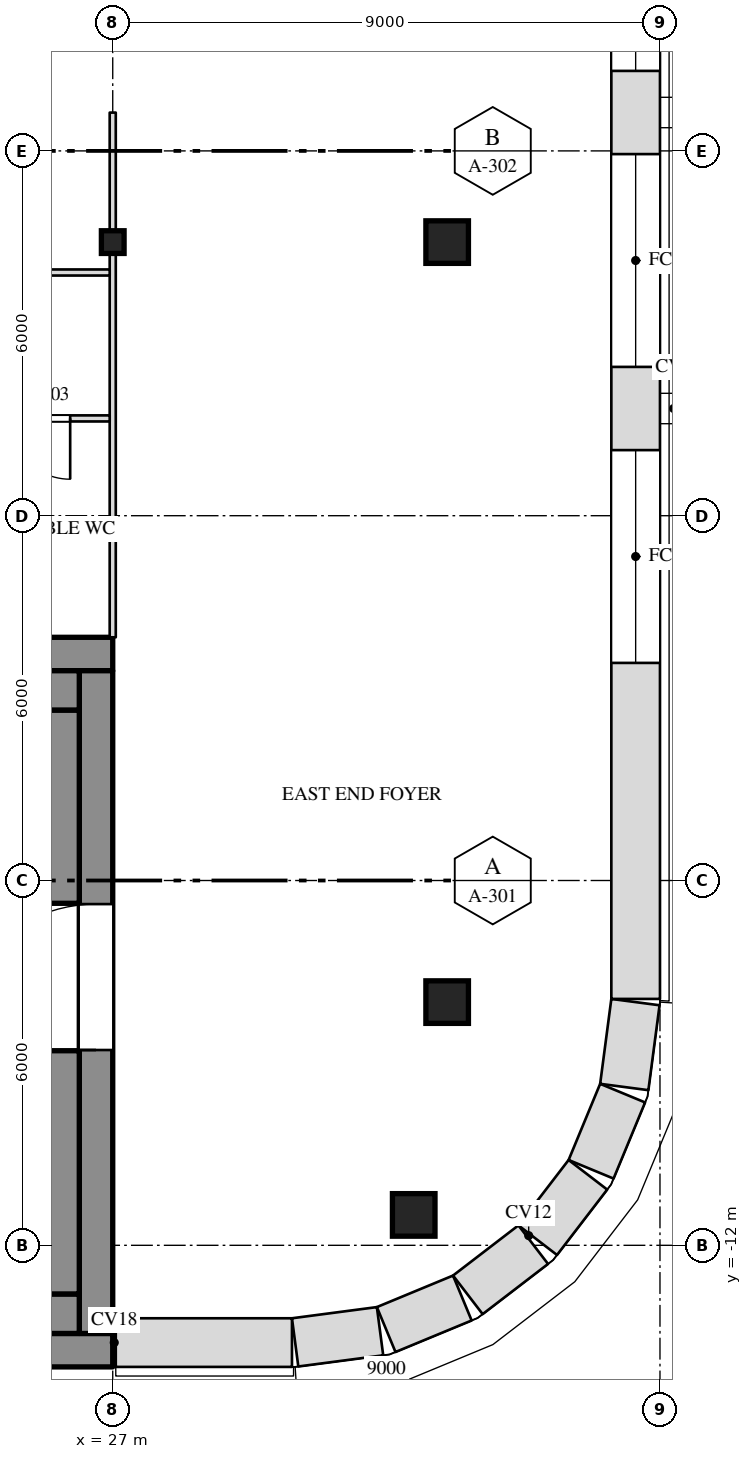
"""IFC4 building model, lengths in metres.
Left out: names, types, materials, properties, quantities, classifications, styles, units other than length and angle.
Written with IfcOpenShell. Run it as: python <this file> out.ifc"""

import sys

from ifc_helpers import new_model, si_unit, direction, frame, frame_2d, origin, origin_2d, place, context, subcontext, project, spatial, rectangle, i_section, extrude, element, fill, save


model = new_model("IFC4")
c1 = context("Model", 3, precision=1e-05, world=origin(), true_north=direction((0.0, 1.0)))
c2 = subcontext(c1, "Body", "Model", "MODEL_VIEW")
j1 = project(units=[si_unit("LENGTHUNIT", "METRE"), si_unit("PLANEANGLEUNIT", "RADIAN")], contexts=[c1])
p1 = place(None, origin())
s1 = spatial("IfcSite", under=j1, at=p1, CompositionType="ELEMENT")
p2 = place(p1, origin())
s2 = spatial("IfcBuilding", under=s1, at=p2, CompositionType="ELEMENT")
p3 = place(p2, frame((0.0, 0.0, 272.5)))
s3 = spatial("IfcBuildingStorey", under=s2, at=p3, CompositionType="ELEMENT", Elevation=272.5)
for number, where, z_axis, x_axis in (
    (1, (31.95, -11.5, 0.0), (0.0, 0.0, 1.0), (1.0, 0.0, 0.0)),
    (2, (32.5, -8.0, 0.0), (0.0, 0.0, 1.0), (1.0, 0.0, 0.0)),
):
    element("IfcColumn", number, at=place(p3, frame(where, z_axis=z_axis, x_axis=x_axis)), inside=s3, PredefinedType="COLUMN", context=c2, shape_type="SweptSolid", body=[
        extrude(rectangle(XDim=0.7, YDim=0.7, at=origin_2d()), origin(), (0.0, 0.0, 1.0), 4.0),
    ])
p4 = place(p3, frame((27.0, 4.5, 0.0), z_axis=(0.0, 0.0, 1.0), x_axis=(1.0, 0.0, 0.0)))
e3 = element("IfcColumn", 3, at=p4, inside=s3, PredefinedType="COLUMN", context=c2, shape_type="SweptSolid", body=[
    extrude(i_section(OverallWidth=0.373, OverallDepth=0.373, WebThickness=0.016, FlangeThickness=0.026, at=origin_2d()), origin(), (0.0, 0.0, 1.0), 4.0),
])
p5 = place(p3, frame((32.5, 4.5, 0.0), z_axis=(0.0, 0.0, 1.0), x_axis=(1.0, 0.0, 0.0)))
e4 = element("IfcColumn", 4, at=p5, inside=s3, PredefinedType="COLUMN", context=c2, shape_type="SweptSolid", body=[
    extrude(rectangle(XDim=0.7, YDim=0.7, at=origin_2d()), origin(), (0.0, 0.0, 1.0), 4.0),
])
p6 = place(p3, frame((-27.0, -2.275, 0.0), z_axis=(0.0, 0.0, 1.0), x_axis=(1.0, 0.0, 0.0)))
e5 = element("IfcWall", 5, at=p6, inside=s3, PredefinedType="SHEAR", context=c2, shape_type="SweptSolid", body=[
    extrude(rectangle(XDim=54.0, YDim=0.55, at=frame_2d((27.0, 0.0))), origin(), (0.0, 0.0, 1.0), 3.78),
])
p7 = place(p6, frame((15.15, 0.0, 0.0)))
e6 = element("IfcOpeningElement", 6, at=p7, cuts=e5, PredefinedType="OPENING", context=c2, shape_type="SweptSolid", body=[
    extrude(rectangle(XDim=2.4, YDim=2.1, at=frame_2d((1.2, 1.05))), frame((0.0, 0.287, 0.0), z_axis=(0.0, -1.0, 0.0), x_axis=(1.0, 0.0, 0.0)), (0.0, 0.0, 1.0), 0.574),
])
p8 = place(p6, frame((36.45, 0.0, 0.0)))
e7 = element("IfcOpeningElement", 7, at=p8, cuts=e5, PredefinedType="OPENING", context=c2, shape_type="SweptSolid", body=[
    extrude(rectangle(XDim=2.4, YDim=2.1, at=frame_2d((1.2, 1.05))), frame((0.0, 0.287, 0.0), z_axis=(0.0, -1.0, 0.0), x_axis=(1.0, 0.0, 0.0)), (0.0, 0.0, 1.0), 0.574),
])
p9 = place(p3, frame((-27.0, -13.725, 0.0), z_axis=(0.0, 0.0, 1.0), x_axis=(1.0, 0.0, 0.0)))
e8 = element("IfcWall", 8, at=p9, inside=s3, PredefinedType="SHEAR", context=c2, shape_type="SweptSolid", body=[
    extrude(rectangle(XDim=54.0, YDim=0.55, at=frame_2d((27.0, 0.0))), origin(), (0.0, 0.0, 1.0), 3.78),
])
p10 = place(p3, frame((26.725, -13.45, 0.0), z_axis=(0.0, 0.0, 1.0), x_axis=(0.0, 1.0, 0.0)))
e9 = element("IfcWall", 9, at=p10, inside=s3, PredefinedType="SHEAR", context=c2, shape_type="SweptSolid", body=[
    extrude(rectangle(XDim=10.9, YDim=0.55, at=frame_2d((5.45, 0.0))), origin(), (0.0, 0.0, 1.0), 3.78),
])
p11 = place(p10, frame((4.662, 0.0, 0.0)))
e10 = element("IfcOpeningElement", 10, at=p11, cuts=e9, PredefinedType="OPENING", context=c2, shape_type="SweptSolid", body=[
    extrude(rectangle(XDim=2.4, YDim=2.1, at=frame_2d((1.2, 1.05))), frame((0.0, 0.287, 0.0), z_axis=(0.0, -1.0, 0.0), x_axis=(1.0, 0.0, 0.0)), (0.0, 0.0, 1.0), 0.574),
])
p12 = place(p3, frame((12.0, -2.875, 0.0), z_axis=(0.0, 0.0, 1.0), x_axis=(1.0, 0.0, 0.0)))
e11 = element("IfcWall", 11, at=p12, inside=s3, PredefinedType="SHEAR", context=c2, shape_type="SweptSolid", body=[
    extrude(rectangle(XDim=14.45, YDim=0.65, at=frame_2d((7.225, 0.0))), origin(), (0.0, 0.0, 1.0), 3.78),
])
p13 = place(p3, frame((-26.45, -13.125, 0.0), z_axis=(0.0, 0.0, 1.0), x_axis=(1.0, 0.0, 0.0)))
e12 = element("IfcWall", 12, at=p13, inside=s3, PredefinedType="SHEAR", context=c2, shape_type="SweptSolid", body=[
    extrude(rectangle(XDim=52.9, YDim=0.65, at=frame_2d((26.45, 0.0))), origin(), (0.0, 0.0, 1.0), 3.78),
])
p14 = place(p3, frame((26.125, -12.8, 0.0), z_axis=(0.0, 0.0, 1.0), x_axis=(0.0, 1.0, 0.0)))
e13 = element("IfcWall", 13, at=p14, inside=s3, PredefinedType="SHEAR", context=c2, shape_type="SweptSolid", body=[
    extrude(rectangle(XDim=4.0, YDim=0.65, at=frame_2d((2.0, 0.0))), origin(), (0.0, 0.0, 1.0), 3.78),
])
p15 = place(p3, frame((26.125, -6.375, 0.0), z_axis=(0.0, 0.0, 1.0), x_axis=(0.0, 1.0, 0.0)))
e14 = element("IfcWall", 14, at=p15, inside=s3, PredefinedType="SHEAR", context=c2, shape_type="SweptSolid", body=[
    extrude(rectangle(XDim=3.175, YDim=0.65, at=frame_2d((1.587, 0.0))), origin(), (0.0, 0.0, 1.0), 3.78),
])
p16 = place(p3, frame((27.0, -2.0, 0.0), z_axis=(0.0, 0.0, 1.0), x_axis=(0.0, 1.0, 0.0)))
e15 = element("IfcWall", 15, at=p16, inside=s3, PredefinedType="PARTITIONING", context=c2, shape_type="SweptSolid", body=[
    extrude(rectangle(XDim=6.313, YDim=0.1, at=frame_2d((3.157, 0.0))), origin(), (0.0, 0.0, 1.0), 3.247),
])
p17 = place(p3, frame((27.0, 4.687, 0.0), z_axis=(0.0, 0.0, 1.0), x_axis=(0.0, 1.0, 0.0)))
e16 = element("IfcWall", 16, at=p17, inside=s3, PredefinedType="PARTITIONING", context=c2, shape_type="SweptSolid", body=[
    extrude(rectangle(XDim=1.943, YDim=0.1, at=frame_2d((0.972, 0.0))), origin(), (0.0, 0.0, 1.0), 3.247),
])
p18 = place(p3, frame((13.55, 1.6, 0.0), z_axis=(0.0, 0.0, 1.0), x_axis=(1.0, 0.0, 0.0)))
e17 = element("IfcWall", 17, at=p18, inside=s3, PredefinedType="PARTITIONING", context=c2, shape_type="SweptSolid", body=[
    extrude(rectangle(XDim=13.4, YDim=0.1, at=frame_2d((6.7, 0.0))), origin(), (0.0, 0.0, 1.0), 3.78),
])
p19 = place(p18, frame((2.225, 0.0, 0.0)))
e18 = element("IfcOpeningElement", 18, at=p19, cuts=e17, PredefinedType="OPENING", context=c2, shape_type="SweptSolid", body=[
    extrude(rectangle(XDim=1.0, YDim=2.1, at=frame_2d((0.5, 1.05))), frame((0.0, 0.062, 0.0), z_axis=(0.0, -1.0, 0.0), x_axis=(1.0, 0.0, 0.0)), (0.0, 0.0, 1.0), 0.124),
])
p20 = place(p18, frame((7.775, 0.0, 0.0)))
e19 = element("IfcOpeningElement", 19, at=p20, cuts=e17, PredefinedType="OPENING", context=c2, shape_type="SweptSolid", body=[
    extrude(rectangle(XDim=1.0, YDim=2.1, at=frame_2d((0.5, 1.05))), frame((0.0, 0.062, 0.0), z_axis=(0.0, -1.0, 0.0), x_axis=(1.0, 0.0, 0.0)), (0.0, 0.0, 1.0), 0.124),
])
p21 = place(p18, frame((11.75, 0.0, 0.0)))
e20 = element("IfcOpeningElement", 20, at=p21, cuts=e17, PredefinedType="OPENING", context=c2, shape_type="SweptSolid", body=[
    extrude(rectangle(XDim=1.0, YDim=2.1, at=frame_2d((0.5, 1.05))), frame((0.0, 0.062, 0.0), z_axis=(0.0, -1.0, 0.0), x_axis=(1.0, 0.0, 0.0)), (0.0, 0.0, 1.0), 0.124),
])
p22 = place(p3, frame((13.45, 4.0, 0.0), z_axis=(0.0, 0.0, 1.0), x_axis=(1.0, 0.0, 0.0)))
e21 = element("IfcWall", 21, at=p22, inside=s3, PredefinedType="PARTITIONING", context=c2, shape_type="SweptSolid", body=[
    extrude(rectangle(XDim=13.5, YDim=0.1, at=frame_2d((6.75, 0.0))), origin(), (0.0, 0.0, 1.0), 3.78),
])
p23 = place(p22, frame((6.3, 0.0, 0.0)))
e22 = element("IfcOpeningElement", 22, at=p23, cuts=e21, PredefinedType="OPENING", context=c2, shape_type="SweptSolid", body=[
    extrude(rectangle(XDim=1.0, YDim=2.1, at=frame_2d((0.5, 1.05))), frame((0.0, 0.062, 0.0), z_axis=(0.0, -1.0, 0.0), x_axis=(1.0, 0.0, 0.0)), (0.0, 0.0, 1.0), 0.124),
])
p24 = place(p3, frame((27.05, -13.6, 0.0), z_axis=(0.0, 0.0, 1.0), x_axis=(1.0, 0.0, 0.0)))
e23 = element("IfcWall", 23, at=p24, inside=s3, PredefinedType="SOLIDWALL", context=c2, shape_type="SweptSolid", body=[
    extrude(rectangle(XDim=2.897, YDim=0.8, at=frame_2d((1.449, 0.0))), origin(), (0.0, 0.0, 1.0), 3.78),
])
p25 = place(p3, frame((30.0, -13.597, 0.0), z_axis=(0.0, 0.0, 1.0), x_axis=(0.99144603414, 0.130517283865, 0.0)))
e24 = element("IfcWall", 24, at=p25, inside=s3, PredefinedType="SOLIDWALL", context=c2, shape_type="SweptSolid", body=[
    extrude(rectangle(XDim=1.408, YDim=0.8, at=frame_2d((0.704, 0.0))), origin(), (0.0, 0.0, 1.0), 3.78),
])
p26 = place(p3, frame((31.497, -13.386, 0.0), z_axis=(0.0, 0.0, 1.0), x_axis=(0.923847774587, 0.38276009378, 0.0)))
e25 = element("IfcWall", 25, at=p26, inside=s3, PredefinedType="SOLIDWALL", context=c2, shape_type="SweptSolid", body=[
    extrude(rectangle(XDim=1.355, YDim=0.8, at=frame_2d((0.678, 0.0))), origin(), (0.0, 0.0, 1.0), 3.78),
])
for number, where, z_axis, x_axis in (
    (26, (32.84, -12.815, 0.0), (0.0, 0.0, 1.0), (0.793, 0.609, 0.0)),
    (27, (33.989, -11.916, 0.0), (0.0, 0.0, 1.0), (0.609, 0.793, 0.0)),
):
    element("IfcWall", number, at=place(p3, frame(where, z_axis=z_axis, x_axis=x_axis)), inside=s3, PredefinedType="SOLIDWALL", context=c2, shape_type="SweptSolid", body=[
        extrude(rectangle(XDim=1.356, YDim=0.8, at=frame_2d((0.678, 0.0))), origin(), (0.0, 0.0, 1.0), 3.78),
    ])
p27 = place(p3, frame((34.867, -10.75, 0.0), z_axis=(0.0, 0.0, 1.0), x_axis=(0.38276009378, 0.923847774587, 0.0)))
e28 = element("IfcWall", 28, at=p27, inside=s3, PredefinedType="SOLIDWALL", context=c2, shape_type="SweptSolid", body=[
    extrude(rectangle(XDim=1.355, YDim=0.8, at=frame_2d((0.678, 0.0))), origin(), (0.0, 0.0, 1.0), 3.78),
])
p28 = place(p3, frame((35.413, -9.396, 0.0), z_axis=(0.0, 0.0, 1.0), x_axis=(0.130517283865, 0.99144603414, 0.0)))
e29 = element("IfcWall", 29, at=p28, inside=s3, PredefinedType="SOLIDWALL", context=c2, shape_type="SweptSolid", body=[
    extrude(rectangle(XDim=1.408, YDim=0.8, at=frame_2d((0.704, 0.0))), origin(), (0.0, 0.0, 1.0), 3.78),
])
p29 = place(p3, frame((35.6, -7.948, 0.0), z_axis=(0.0, 0.0, 1.0), x_axis=(0.0, 1.0, 0.0)))
e30 = element("IfcWall", 30, at=p29, inside=s3, PredefinedType="SOLIDWALL", context=c2, shape_type="SweptSolid", body=[
    extrude(rectangle(XDim=38.895, YDim=0.8, at=frame_2d((19.448, 0.0))), origin(), (0.0, 0.0, 1.0), 3.78),
])
p30 = place(p29, frame((5.526, 0.0, 1.0)))
e31 = element("IfcOpeningElement", 31, at=p30, cuts=e30, PredefinedType="OPENING", context=c2, shape_type="SweptSolid", body=[
    extrude(rectangle(XDim=3.5, YDim=2.5, at=frame_2d((1.75, 1.25))), frame((0.0, 0.412, 0.0), z_axis=(0.0, -1.0, 0.0), x_axis=(1.0, 0.0, 0.0)), (0.0, 0.0, 1.0), 0.824),
])
p31 = place(p29, frame((10.395, 0.0, 1.0)))
e32 = element("IfcOpeningElement", 32, at=p31, cuts=e30, PredefinedType="OPENING", context=c2, shape_type="SweptSolid", body=[
    extrude(rectangle(XDim=3.5, YDim=2.5, at=frame_2d((1.75, 1.25))), frame((0.0, 0.412, 0.0), z_axis=(0.0, -1.0, 0.0), x_axis=(1.0, 0.0, 0.0)), (0.0, 0.0, 1.0), 0.824),
])
p32 = place(p29, frame((15.263, 0.0, 1.0)))
e33 = element("IfcOpeningElement", 33, at=p32, cuts=e30, PredefinedType="OPENING", context=c2, shape_type="SweptSolid", body=[
    extrude(rectangle(XDim=3.5, YDim=2.5, at=frame_2d((1.75, 1.25))), frame((0.0, 0.412, 0.0), z_axis=(0.0, -1.0, 0.0), x_axis=(1.0, 0.0, 0.0)), (0.0, 0.0, 1.0), 0.824),
])
p33 = place(p29, frame((20.132, 0.0, 1.0)))
e34 = element("IfcOpeningElement", 34, at=p33, cuts=e30, PredefinedType="OPENING", context=c2, shape_type="SweptSolid", body=[
    extrude(rectangle(XDim=3.5, YDim=2.5, at=frame_2d((1.75, 1.25))), frame((0.0, 0.412, 0.0), z_axis=(0.0, -1.0, 0.0), x_axis=(1.0, 0.0, 0.0)), (0.0, 0.0, 1.0), 0.824),
])
p34 = place(p29, frame((25.0, 0.0, 1.0)))
e35 = element("IfcOpeningElement", 35, at=p34, cuts=e30, PredefinedType="OPENING", context=c2, shape_type="SweptSolid", body=[
    extrude(rectangle(XDim=3.5, YDim=2.5, at=frame_2d((1.75, 1.25))), frame((0.0, 0.412, 0.0), z_axis=(0.0, -1.0, 0.0), x_axis=(1.0, 0.0, 0.0)), (0.0, 0.0, 1.0), 0.824),
])
p35 = place(p29, frame((29.869, 0.0, 1.0)))
e36 = element("IfcOpeningElement", 36, at=p35, cuts=e30, PredefinedType="OPENING", context=c2, shape_type="SweptSolid", body=[
    extrude(rectangle(XDim=3.5, YDim=2.5, at=frame_2d((1.75, 1.25))), frame((0.0, 0.412, 0.0), z_axis=(0.0, -1.0, 0.0), x_axis=(1.0, 0.0, 0.0)), (0.0, 0.0, 1.0), 0.824),
])
p36 = place(p21, origin())
e37 = element("IfcDoor", 37, at=p36, inside=s3, OperationType="SINGLE_SWING_LEFT", PredefinedType="DOOR", context=c2, shape_type="SweptSolid", body=[
    extrude(rectangle(XDim=1.0, YDim=2.1, at=frame_2d((0.5, 1.05))), frame((0.0, 0.025, 0.0), z_axis=(0.0, -1.0, 0.0), x_axis=(1.0, 0.0, 0.0)), (0.0, 0.0, 1.0), 0.05),
])
fill(e20, e37)
p37 = place(p30, origin())
e38 = element("IfcWindow", 38, at=p37, inside=s3, PartitioningType="SINGLE_PANEL", PredefinedType="WINDOW", context=c2, shape_type="SweptSolid", body=[
    extrude(rectangle(XDim=3.5, YDim=2.5, at=frame_2d((1.75, 1.25))), frame((0.0, 0.03, 0.0), z_axis=(0.0, -1.0, 0.0), x_axis=(1.0, 0.0, 0.0)), (0.0, 0.0, 1.0), 0.06),
])
fill(e31, e38)
p38 = place(p31, origin())
e39 = element("IfcWindow", 39, at=p38, inside=s3, PartitioningType="SINGLE_PANEL", PredefinedType="WINDOW", context=c2, shape_type="SweptSolid", body=[
    extrude(rectangle(XDim=3.5, YDim=2.5, at=frame_2d((1.75, 1.25))), frame((0.0, 0.03, 0.0), z_axis=(0.0, -1.0, 0.0), x_axis=(1.0, 0.0, 0.0)), (0.0, 0.0, 1.0), 0.06),
])
fill(e32, e39)
p39 = place(p32, origin())
e40 = element("IfcWindow", 40, at=p39, inside=s3, PartitioningType="SINGLE_PANEL", PredefinedType="WINDOW", context=c2, shape_type="SweptSolid", body=[
    extrude(rectangle(XDim=3.5, YDim=2.5, at=frame_2d((1.75, 1.25))), frame((0.0, 0.03, 0.0), z_axis=(0.0, -1.0, 0.0), x_axis=(1.0, 0.0, 0.0)), (0.0, 0.0, 1.0), 0.06),
])
fill(e33, e40)
p40 = place(p11, origin())
e41 = element("IfcDoor", 41, at=p40, inside=s3, OperationType="DOUBLE_DOOR_SINGLE_SWING", PredefinedType="DOOR", context=c2, shape_type="SweptSolid", body=[
    extrude(rectangle(XDim=2.4, YDim=2.1, at=frame_2d((1.2, 1.05))), frame((0.0, 0.025, 0.0), z_axis=(0.0, -1.0, 0.0), x_axis=(1.0, 0.0, 0.0)), (0.0, 0.0, 1.0), 0.05),
])
fill(e10, e41)
save(model, sys.argv[1])
